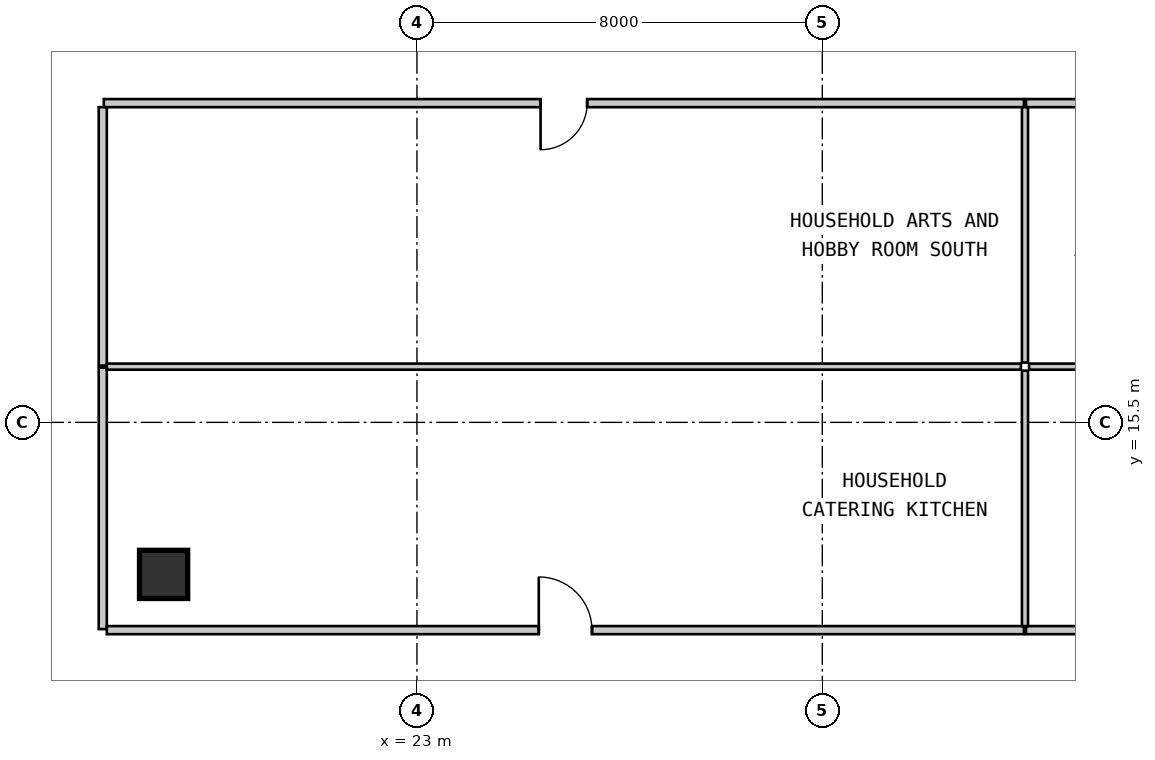
"""IFC4 building model, lengths in metres.
Left out: names, types, materials, properties, quantities, classifications, styles, units other than length and angle.
Written with IfcOpenShell. Run it as: python <this file> out.ifc"""

import sys

from ifc_helpers import new_model, si_unit, direction, frame, frame_2d, origin, origin_2d, place, context, subcontext, project, spatial, rectangle, extrude, source, transform, mapped, element, fill, save


model = new_model("IFC4")
c1 = context("Model", 3, precision=1e-05, world=origin(), true_north=direction((0.0, 1.0)))
c2 = subcontext(c1, "Body", "Model", "MODEL_VIEW")
j1 = project(units=[si_unit("LENGTHUNIT", "METRE"), si_unit("PLANEANGLEUNIT", "RADIAN")], contexts=[c1])
p1 = place(None, origin())
s1 = spatial("IfcSite", under=j1, at=p1, CompositionType="ELEMENT")
p2 = place(p1, origin())
s2 = spatial("IfcBuilding", under=s1, at=p2, CompositionType="ELEMENT")
p3 = place(p2, frame((0.0, 0.0, 19.95)))
s3 = spatial("IfcBuildingStorey", under=s2, at=p3, CompositionType="ELEMENT", Elevation=19.95)
m1 = source(origin(), c2, "Body", "SweptSolid", [
    extrude(rectangle(XDim=0.95, YDim=0.95, at=origin_2d()), origin(), (0.0, 0.0, 1.0), 3.15),
])
p4 = place(p3, frame((18.0, 12.5, 0.0), z_axis=(0.0, 0.0, 1.0), x_axis=(1.0, 0.0, 0.0)))
e1 = element("IfcColumn", 1, at=p4, inside=s3, PredefinedType="COLUMN", context=c2, shape_type="MappedRepresentation", body=[
    mapped(m1, transform((0.0, 0.0, 0.0), scale=1.0)),
])
m2 = source(origin(), c2, "Body", "SweptSolid", [
    extrude(rectangle(XDim=5.16, YDim=0.16, at=frame_2d((2.58, 0.0))), origin(), (0.0, 0.0, 1.0), 2.93),
])
p5 = place(p3, frame((16.8, 16.58, 0.0), z_axis=(0.0, 0.0, 1.0), x_axis=(0.0, -1.0, 0.0)))
e2 = element("IfcWall", 2, at=p5, inside=s3, PredefinedType="PARTITIONING", context=c2, shape_type="MappedRepresentation", body=[
    mapped(m2, transform((0.0, 0.0, 0.0), scale=1.0)),
])
m3 = source(origin(), c2, "Body", "SweptSolid", [
    extrude(rectangle(XDim=18.159, YDim=0.16, at=frame_2d((9.08, 0.0))), origin(), (0.0, 0.0, 1.0), 2.93),
])
p6 = place(p3, frame((34.98, 21.8, 0.0), z_axis=(0.0, 0.0, 1.0), x_axis=(-1.0, 0.0, 0.0)))
e3 = element("IfcWall", 3, at=p6, inside=s3, PredefinedType="PARTITIONING", context=c2, shape_type="MappedRepresentation", body=[
    mapped(m3, transform((0.0, 0.0, 0.0), scale=1.0)),
])
m4 = source(origin(), c2, "Body", "SweptSolid", [
    extrude(rectangle(XDim=0.92, YDim=2.1, at=frame_2d((0.46, 1.05))), frame((0.0, 0.09, 0.0), z_axis=(0.0, -1.0, 0.0), x_axis=(1.0, 0.0, 0.0)), (0.0, 0.0, 1.0), 0.18),
])
p7 = place(p6, frame((8.62, 0.0, 0.0)))
e4 = element("IfcOpeningElement", 4, at=p7, cuts=e3, PredefinedType="OPENING", context=c2, shape_type="MappedRepresentation", body=[
    mapped(m4, transform((0.0, 0.0, 0.0), scale=1.0)),
])
m5 = source(origin(), c2, "Body", "SweptSolid", [
    extrude(rectangle(XDim=5.1, YDim=0.16, at=frame_2d((2.55, 0.0))), origin(), (0.0, 0.0, 1.0), 2.93),
])
p8 = place(p3, frame((16.8, 21.72, 0.0), z_axis=(0.0, 0.0, 1.0), x_axis=(0.0, -1.0, 0.0)))
e5 = element("IfcWall", 5, at=p8, inside=s3, PredefinedType="PARTITIONING", context=c2, shape_type="MappedRepresentation", body=[
    mapped(m5, transform((0.0, 0.0, 0.0), scale=1.0)),
])
p9 = place(p3, frame((53.18, 21.8, 0.0), z_axis=(0.0, 0.0, 1.0), x_axis=(-1.0, 0.0, 0.0)))
e6 = element("IfcWall", 6, at=p9, inside=s3, PredefinedType="PARTITIONING", context=c2, shape_type="MappedRepresentation", body=[
    mapped(m3, transform((0.0, 0.0, 0.0), scale=1.0)),
])
p10 = place(p9, frame((8.62, 0.0, 0.0)))
e7 = element("IfcOpeningElement", 7, at=p10, cuts=e6, PredefinedType="OPENING", context=c2, shape_type="MappedRepresentation", body=[
    mapped(m4, transform((0.0, 0.0, 0.0), scale=1.0)),
])
m6 = source(origin(), c2, "Body", "SweptSolid", [
    extrude(rectangle(XDim=18.1, YDim=0.16, at=frame_2d((9.05, 0.0))), origin(), (0.0, 0.0, 1.0), 2.93),
])
p11 = place(p3, frame((16.88, 11.4, 0.0), z_axis=(0.0, 0.0, 1.0), x_axis=(1.0, 0.0, 0.0)))
e8 = element("IfcWall", 8, at=p11, inside=s3, PredefinedType="PARTITIONING", context=c2, shape_type="MappedRepresentation", body=[
    mapped(m6, transform((0.0, 0.0, 0.0), scale=1.0)),
])
m7 = source(origin(), c2, "Body", "SweptSolid", [
    extrude(rectangle(XDim=1.05, YDim=2.1, at=frame_2d((0.525, 1.05))), frame((0.0, 0.09, 0.0), z_axis=(0.0, -1.0, 0.0), x_axis=(1.0, 0.0, 0.0)), (0.0, 0.0, 1.0), 0.18),
])
p12 = place(p11, frame((8.525, 0.0, 0.0)))
e9 = element("IfcOpeningElement", 9, at=p12, cuts=e8, PredefinedType="OPENING", context=c2, shape_type="MappedRepresentation", body=[
    mapped(m7, transform((0.0, 0.0, 0.0), scale=1.0)),
])
p13 = place(p3, frame((35.02, 11.4, 0.0), z_axis=(0.0, 0.0, 1.0), x_axis=(1.0, 0.0, 0.0)))
e10 = element("IfcWall", 10, at=p13, inside=s3, PredefinedType="PARTITIONING", context=c2, shape_type="MappedRepresentation", body=[
    mapped(m6, transform((0.0, 0.0, 0.0), scale=1.0)),
])
p14 = place(p13, frame((8.525, 0.0, 0.0)))
e11 = element("IfcOpeningElement", 11, at=p14, cuts=e10, PredefinedType="OPENING", context=c2, shape_type="MappedRepresentation", body=[
    mapped(m7, transform((0.0, 0.0, 0.0), scale=1.0)),
])
m8 = source(origin(), c2, "Body", "SweptSolid", [
    extrude(rectangle(XDim=18.04, YDim=0.12, at=frame_2d((9.02, 0.0))), origin(), (0.0, 0.0, 1.0), 2.93),
])
p15 = place(p3, frame((16.88, 16.6, 0.0), z_axis=(0.0, 0.0, 1.0), x_axis=(1.0, 0.0, 0.0)))
e12 = element("IfcWall", 12, at=p15, inside=s3, PredefinedType="PARTITIONING", context=c2, shape_type="MappedRepresentation", body=[
    mapped(m8, transform((0.0, 0.0, 0.0), scale=1.0)),
])
m9 = source(origin(), c2, "Body", "SweptSolid", [
    extrude(rectangle(XDim=5.04, YDim=0.12, at=frame_2d((2.52, 0.0))), origin(), (0.0, 0.0, 1.0), 2.93),
])
for number, where, z_axis, x_axis in (
    (13, (35.0, 16.52, 0.0), (0.0, 0.0, 1.0), (0.0, -1.0, 0.0)),
    (14, (35.0, 21.72, 0.0), (0.0, 0.0, 1.0), (0.0, -1.0, 0.0)),
):
    element("IfcWall", number, at=place(p3, frame(where, z_axis=z_axis, x_axis=x_axis)), inside=s3, PredefinedType="PARTITIONING", context=c2, shape_type="MappedRepresentation", body=[
        mapped(m9, transform((0.0, 0.0, 0.0), scale=1.0)),
    ])
p16 = place(p3, frame((35.08, 16.6, 0.0), z_axis=(0.0, 0.0, 1.0), x_axis=(1.0, 0.0, 0.0)))
e15 = element("IfcWall", 15, at=p16, inside=s3, PredefinedType="PARTITIONING", context=c2, shape_type="MappedRepresentation", body=[
    mapped(m8, transform((0.0, 0.0, 0.0), scale=1.0)),
])
m10 = source(origin(), c2, "Body", "SweptSolid", [
    extrude(rectangle(XDim=0.92, YDim=2.1, at=frame_2d((0.46, 1.05))), frame((0.0, 0.025, 0.0), z_axis=(0.0, -1.0, 0.0), x_axis=(1.0, 0.0, 0.0)), (0.0, 0.0, 1.0), 0.05),
])
p17 = place(p7, origin())
e16 = element("IfcDoor", 16, at=p17, inside=s3, OperationType="SINGLE_SWING_RIGHT", PredefinedType="DOOR", context=c2, shape_type="MappedRepresentation", body=[
    mapped(m10, transform((0.0, 0.0, 0.0), scale=1.0)),
])
fill(e4, e16)
m11 = source(origin(), c2, "Body", "SweptSolid", [
    extrude(rectangle(XDim=1.05, YDim=2.1, at=frame_2d((0.525, 1.05))), frame((0.0, 0.025, 0.0), z_axis=(0.0, -1.0, 0.0), x_axis=(1.0, 0.0, 0.0)), (0.0, 0.0, 1.0), 0.05),
])
p18 = place(p12, origin())
e17 = element("IfcDoor", 17, at=p18, inside=s3, OperationType="SINGLE_SWING_LEFT", PredefinedType="DOOR", context=c2, shape_type="MappedRepresentation", body=[
    mapped(m11, transform((0.0, 0.0, 0.0), scale=1.0)),
])
fill(e9, e17)
save(model, sys.argv[1])
